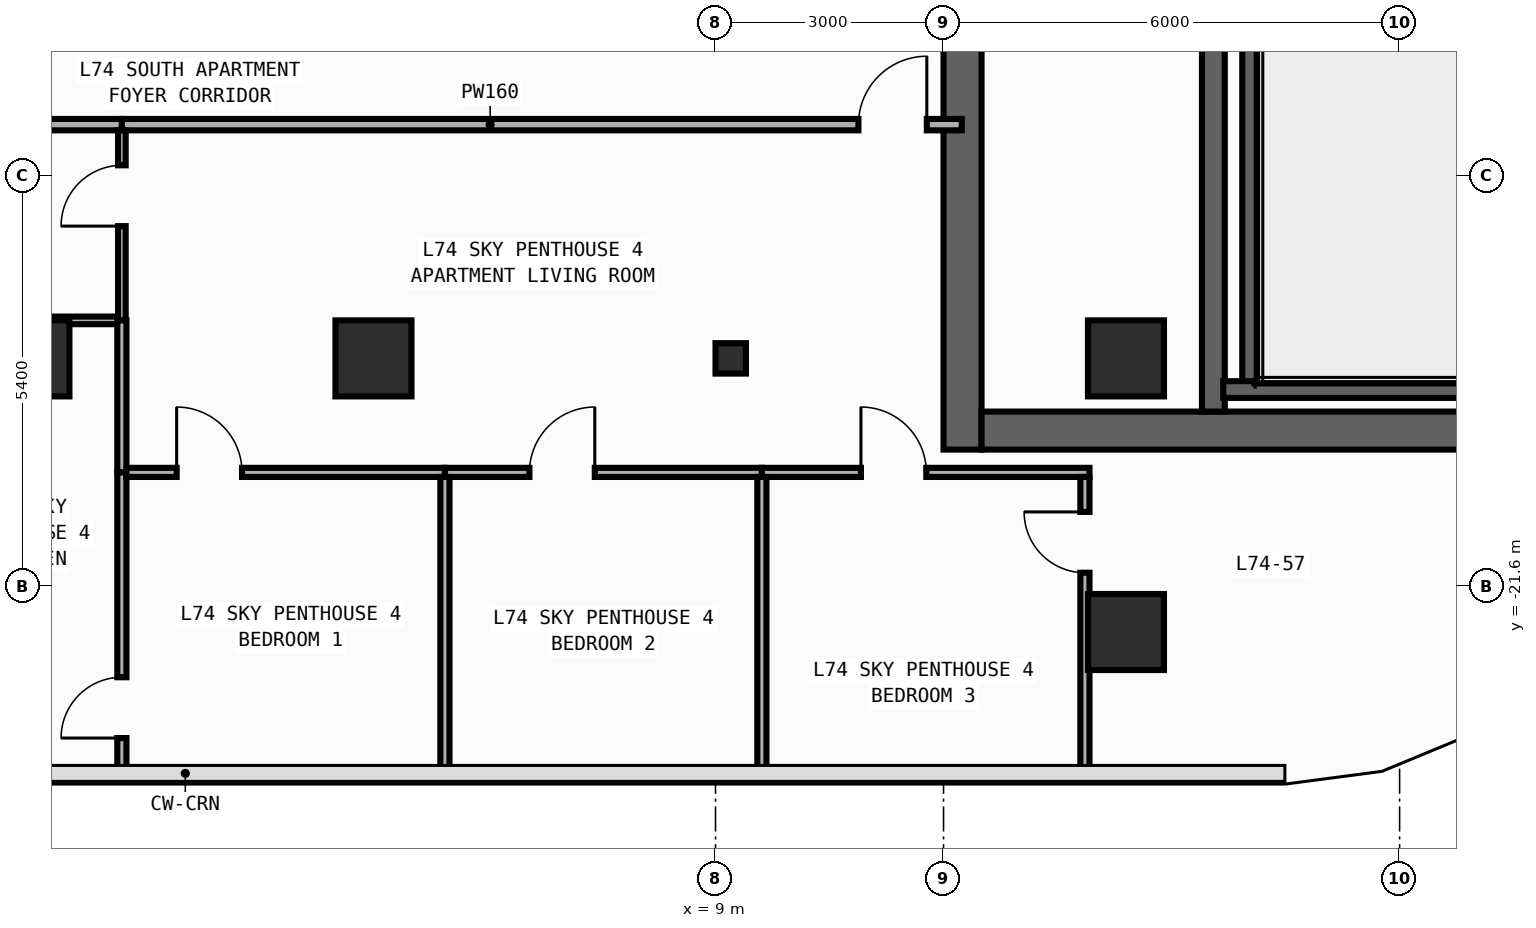
"""IFC4 building model, lengths in metres.
Left out: names, types, materials, properties, quantities, classifications, styles, units other than length and angle.
Written with IfcOpenShell. Run it as: python <this file> out.ifc"""

import sys

from ifc_helpers import new_model, si_unit, direction, frame, frame_2d, origin, origin_2d, place, context, subcontext, project, spatial, rectangle, circle, i_section, extrude, element, fill, save


model = new_model("IFC4")
c1 = context("Model", 3, precision=1e-05, world=origin(), true_north=direction((0.0, 1.0)))
c2 = subcontext(c1, "Body", "Model", "MODEL_VIEW")
j1 = project(units=[si_unit("LENGTHUNIT", "METRE"), si_unit("PLANEANGLEUNIT", "RADIAN")], contexts=[c1])
p1 = place(None, origin())
s1 = spatial("IfcSite", under=j1, at=p1, CompositionType="ELEMENT")
p2 = place(p1, origin())
s2 = spatial("IfcBuilding", under=s1, at=p2, CompositionType="ELEMENT")
p3 = place(p2, frame((0.0, 0.0, 308.0)))
s3 = spatial("IfcBuildingStorey", under=s2, at=p3, CompositionType="ELEMENT", Elevation=308.0)
p4 = place(p3, frame((12.25, -19.8, 0.0), z_axis=(0.0, 0.0, 1.0), x_axis=(0.0, 1.0, 0.0)))
e1 = element("IfcWall", 1, at=p4, inside=s3, PredefinedType="SHEAR", context=c2, shape_type="SweptSolid", body=[
    extrude(rectangle(XDim=27.0, YDim=0.5, at=frame_2d((13.5, 0.0))), origin(), (0.0, 0.0, 1.0), 3.54),
])
p5 = place(p4, frame((23.05, 0.0, 0.0)))
e2 = element("IfcOpeningElement", 2, at=p5, cuts=e1, PredefinedType="OPENING", context=c2, shape_type="SweptSolid", body=[
    extrude(rectangle(XDim=1.1, YDim=2.2, at=frame_2d((0.55, 1.1))), frame((0.0, 0.26, 0.0), z_axis=(0.0, -1.0, 0.0), x_axis=(1.0, 0.0, 0.0)), (0.0, 0.0, 1.0), 0.52),
])
p6 = place(p4, frame((19.85, 0.0, 0.0)))
e3 = element("IfcOpeningElement", 3, at=p6, cuts=e1, PredefinedType="OPENING", context=c2, shape_type="SweptSolid", body=[
    extrude(rectangle(XDim=1.1, YDim=2.2, at=frame_2d((0.55, 1.1))), frame((0.0, 0.26, 0.0), z_axis=(0.0, -1.0, 0.0), x_axis=(1.0, 0.0, 0.0)), (0.0, 0.0, 1.0), 0.52),
])
p7 = place(p4, frame((16.65, 0.0, 0.0)))
e4 = element("IfcOpeningElement", 4, at=p7, cuts=e1, PredefinedType="OPENING", context=c2, shape_type="SweptSolid", body=[
    extrude(rectangle(XDim=1.1, YDim=2.2, at=frame_2d((0.55, 1.1))), frame((0.0, 0.26, 0.0), z_axis=(0.0, -1.0, 0.0), x_axis=(1.0, 0.0, 0.0)), (0.0, 0.0, 1.0), 0.52),
])
p8 = place(p4, frame((6.275, 0.0, 0.0)))
e5 = element("IfcOpeningElement", 5, at=p8, cuts=e1, PredefinedType="OPENING", context=c2, shape_type="SweptSolid", body=[
    extrude(rectangle(XDim=0.85, YDim=2.1, at=frame_2d((0.425, 1.05))), frame((0.0, 0.26, 0.0), z_axis=(0.0, -1.0, 0.0), x_axis=(1.0, 0.0, 0.0)), (0.0, 0.0, 1.0), 0.52),
])
p9 = place(p4, frame((8.575, 0.0, 0.0)))
e6 = element("IfcOpeningElement", 6, at=p9, cuts=e1, PredefinedType="OPENING", context=c2, shape_type="SweptSolid", body=[
    extrude(rectangle(XDim=0.85, YDim=2.1, at=frame_2d((0.425, 1.05))), frame((0.0, 0.26, 0.0), z_axis=(0.0, -1.0, 0.0), x_axis=(1.0, 0.0, 0.0)), (0.0, 0.0, 1.0), 0.52),
])
p10 = place(p4, frame((10.675, 0.0, 0.0)))
e7 = element("IfcOpeningElement", 7, at=p10, cuts=e1, PredefinedType="OPENING", context=c2, shape_type="SweptSolid", body=[
    extrude(rectangle(XDim=0.85, YDim=2.1, at=frame_2d((0.425, 1.05))), frame((0.0, 0.26, 0.0), z_axis=(0.0, -1.0, 0.0), x_axis=(1.0, 0.0, 0.0)), (0.0, 0.0, 1.0), 0.52),
])
p11 = place(p4, frame((12.725, 0.0, 0.0)))
e8 = element("IfcOpeningElement", 8, at=p11, cuts=e1, PredefinedType="OPENING", context=c2, shape_type="SweptSolid", body=[
    extrude(rectangle(XDim=1.15, YDim=2.2, at=frame_2d((0.575, 1.1))), frame((0.0, 0.26, 0.0), z_axis=(0.0, -1.0, 0.0), x_axis=(1.0, 0.0, 0.0)), (0.0, 0.0, 1.0), 0.52),
])
p12 = place(p4, frame((25.125, 0.0, 0.0)))
e9 = element("IfcOpeningElement", 9, at=p12, cuts=e1, PredefinedType="OPENING", context=c2, shape_type="SweptSolid", body=[
    extrude(rectangle(XDim=0.85, YDim=2.1, at=frame_2d((0.425, 1.05))), frame((0.0, 0.26, 0.0), z_axis=(0.0, -1.0, 0.0), x_axis=(1.0, 0.0, 0.0)), (0.0, 0.0, 1.0), 0.52),
])
p13 = place(p3, frame((12.5, -19.55, 0.0), z_axis=(0.0, 0.0, 1.0), x_axis=(1.0, 0.0, 0.0)))
e10 = element("IfcWall", 10, at=p13, inside=s3, PredefinedType="SHEAR", context=c2, shape_type="SweptSolid", body=[
    extrude(rectangle(XDim=7.4, YDim=0.5, at=frame_2d((3.7, 0.0))), origin(), (0.0, 0.0, 1.0), 3.54),
])
p14 = place(p3, frame((15.55, -19.3, 0.0), z_axis=(0.0, 0.0, 1.0), x_axis=(0.0, 1.0, 0.0)))
e11 = element("IfcWall", 11, at=p14, inside=s3, PredefinedType="SHEAR", context=c2, shape_type="SweptSolid", body=[
    extrude(rectangle(XDim=26.0, YDim=0.3, at=frame_2d((13.0, 0.0))), origin(), (0.0, 0.0, 1.0), 3.54),
])
p15 = place(p14, frame((12.225, 0.0, 0.0)))
e12 = element("IfcOpeningElement", 12, at=p15, cuts=e11, PredefinedType="OPENING", context=c2, shape_type="SweptSolid", body=[
    extrude(rectangle(XDim=1.15, YDim=2.2, at=frame_2d((0.575, 1.1))), frame((0.0, 0.16, 0.0), z_axis=(0.0, -1.0, 0.0), x_axis=(1.0, 0.0, 0.0)), (0.0, 0.0, 1.0), 0.32),
])
p16 = place(p14, frame((24.625, 0.0, 0.0)))
e13 = element("IfcOpeningElement", 13, at=p16, cuts=e11, PredefinedType="OPENING", context=c2, shape_type="SweptSolid", body=[
    extrude(rectangle(XDim=0.85, YDim=2.1, at=frame_2d((0.425, 1.05))), frame((0.0, 0.16, 0.0), z_axis=(0.0, -1.0, 0.0), x_axis=(1.0, 0.0, 0.0)), (0.0, 0.0, 1.0), 0.32),
])
p17 = place(p3, frame((16.04, -19.01, 0.0), z_axis=(0.0, 0.0, 1.0), x_axis=(0.0, 1.0, 0.0)))
e14 = element("IfcWall", 14, at=p17, inside=s3, PredefinedType="SHEAR", context=c2, shape_type="SweptSolid", body=[
    extrude(rectangle(XDim=11.42, YDim=0.22, at=frame_2d((5.71, 0.0))), origin(), (0.0, 0.0, 1.0), 3.54),
])
p18 = place(p3, frame((15.68, -19.01, 0.0), z_axis=(0.0, 0.0, 1.0), x_axis=(1.0, 0.0, 0.0)))
e15 = element("IfcWall", 15, at=p18, inside=s3, PredefinedType="SHEAR", context=c2, shape_type="SweptSolid", body=[
    extrude(rectangle(XDim=4.24, YDim=0.22, at=frame_2d((2.12, 0.0))), origin(), (0.0, 0.0, 1.0), 3.54),
])
p19 = place(p3, frame((9.2, -18.6, 0.0), z_axis=(0.0, 0.0, 1.0), x_axis=(1.0, 0.0, 0.0)))
e16 = element("IfcColumn", 16, at=p19, inside=s3, PredefinedType="COLUMN", context=c2, shape_type="SweptSolid", body=[
    extrude(i_section(OverallWidth=0.4, OverallDepth=0.4, WebThickness=0.013, FlangeThickness=0.021, FilletRadius=0.022, at=origin_2d()), origin(), (0.0, 0.0, 1.0), 3.8),
])
for number, where, z_axis, x_axis in (
    (17, (14.4, -18.6, 0.0), (0.0, 0.0, 1.0), (1.0, 0.0, 0.0)),
    (18, (0.0, -18.6, 0.0), (0.0, 0.0, 1.0), (1.0, 0.0, 0.0)),
    (19, (4.5, -18.6, 0.0), (0.0, 0.0, 1.0), (1.0, 0.0, 0.0)),
    (20, (14.4, -22.2, 0.0), (0.0, 0.0, 1.0), (1.0, 0.0, 0.0)),
):
    element("IfcColumn", number, at=place(p3, frame(where, z_axis=z_axis, x_axis=x_axis)), inside=s3, PredefinedType="COLUMN", context=c2, shape_type="SweptSolid", body=[
        extrude(circle(Radius=0.5, at=origin_2d()), origin(), (0.0, 0.0, 1.0), 3.8),
    ])
p20 = place(p3, frame((-1.4, -15.525, 0.0), z_axis=(0.0, 0.0, 1.0), x_axis=(1.0, 0.0, 0.0)))
e21 = element("IfcWall", 21, at=p20, inside=s3, PredefinedType="PARTITIONING", context=c2, shape_type="SweptSolid", body=[
    extrude(rectangle(XDim=2.59, YDim=0.15, at=frame_2d((1.295, 0.0))), origin(), (0.0, 0.0, 1.0), 3.54),
])
p21 = place(p3, frame((1.19, -15.525, 0.0), z_axis=(0.0, 0.0, 1.0), x_axis=(1.0, 0.0, 0.0)))
e22 = element("IfcWall", 22, at=p21, inside=s3, PredefinedType="PARTITIONING", context=c2, shape_type="SweptSolid", body=[
    extrude(rectangle(XDim=11.05, YDim=0.15, at=frame_2d((5.525, 0.0))), origin(), (0.0, 0.0, 1.0), 3.54),
])
p22 = place(p21, frame((9.69, 0.0, 0.0)))
e23 = element("IfcOpeningElement", 23, at=p22, cuts=e22, PredefinedType="OPENING", context=c2, shape_type="SweptSolid", body=[
    extrude(rectangle(XDim=0.9, YDim=2.15, at=frame_2d((0.45, 1.075))), frame((0.0, 0.085, 0.0), z_axis=(0.0, -1.0, 0.0), x_axis=(1.0, 0.0, 0.0)), (0.0, 0.0, 1.0), 0.17),
])
p23 = place(p3, frame((-1.33, -18.1, 0.0), z_axis=(0.0, 0.0, 1.0), x_axis=(1.0, 0.0, 0.0)))
e24 = element("IfcWall", 24, at=p23, inside=s3, PredefinedType="PARTITIONING", context=c2, shape_type="SweptSolid", body=[
    extrude(rectangle(XDim=2.47, YDim=0.1, at=frame_2d((1.235, 0.0))), origin(), (0.0, 0.0, 1.0), 3.54),
])
p24 = place(p3, frame((1.19, -18.1, 0.0), z_axis=(0.0, 0.0, 1.0), x_axis=(0.0, 1.0, 0.0)))
e25 = element("IfcWall", 25, at=p24, inside=s3, PredefinedType="PARTITIONING", context=c2, shape_type="SweptSolid", body=[
    extrude(rectangle(XDim=2.5, YDim=0.1, at=frame_2d((1.25, 0.0))), origin(), (0.0, 0.0, 1.0), 3.54),
])
p25 = place(p24, frame((1.24, 0.0, 0.0)))
e26 = element("IfcOpeningElement", 26, at=p25, cuts=e25, PredefinedType="OPENING", context=c2, shape_type="SweptSolid", body=[
    extrude(rectangle(XDim=0.8, YDim=2.1, at=frame_2d((0.4, 1.05))), frame((0.0, 0.06, 0.0), z_axis=(0.0, -1.0, 0.0), x_axis=(1.0, 0.0, 0.0)), (0.0, 0.0, 1.0), 0.12),
])
p26 = place(p3, frame((1.19, -20.1, 0.0), z_axis=(0.0, 0.0, 1.0), x_axis=(0.0, 1.0, 0.0)))
e27 = element("IfcWall", 27, at=p26, inside=s3, PredefinedType="PARTITIONING", context=c2, shape_type="SweptSolid", body=[
    extrude(rectangle(XDim=2.0, YDim=0.12, at=frame_2d((1.0, 0.0))), origin(), (0.0, 0.0, 1.0), 3.54),
])
p27 = place(p3, frame((1.19, -24.055, 0.0), z_axis=(0.0, 0.0, 1.0), x_axis=(0.0, 1.0, 0.0)))
e28 = element("IfcWall", 28, at=p27, inside=s3, PredefinedType="PARTITIONING", context=c2, shape_type="SweptSolid", body=[
    extrude(rectangle(XDim=3.955, YDim=0.12, at=frame_2d((1.978, 0.0))), origin(), (0.0, 0.0, 1.0), 3.54),
])
p28 = place(p27, frame((0.46, 0.0, 0.0)))
e29 = element("IfcOpeningElement", 29, at=p28, cuts=e28, PredefinedType="OPENING", context=c2, shape_type="SweptSolid", body=[
    extrude(rectangle(XDim=0.8, YDim=2.1, at=frame_2d((0.4, 1.05))), frame((0.0, 0.07, 0.0), z_axis=(0.0, -1.0, 0.0), x_axis=(1.0, 0.0, 0.0)), (0.0, 0.0, 1.0), 0.14),
])
p29 = place(p3, frame((1.25, -20.1, 0.0), z_axis=(0.0, 0.0, 1.0), x_axis=(1.0, 0.0, 0.0)))
e30 = element("IfcWall", 30, at=p29, inside=s3, PredefinedType="PARTITIONING", context=c2, shape_type="SweptSolid", body=[
    extrude(rectangle(XDim=4.19, YDim=0.12, at=frame_2d((2.095, 0.0))), origin(), (0.0, 0.0, 1.0), 3.54),
])
p30 = place(p29, frame((0.661, 0.0, 0.0)))
e31 = element("IfcOpeningElement", 31, at=p30, cuts=e30, PredefinedType="OPENING", context=c2, shape_type="SweptSolid", body=[
    extrude(rectangle(XDim=0.86, YDim=2.15, at=frame_2d((0.43, 1.075))), frame((0.0, 0.07, 0.0), z_axis=(0.0, -1.0, 0.0), x_axis=(1.0, 0.0, 0.0)), (0.0, 0.0, 1.0), 0.14),
])
p31 = place(p3, frame((5.44, -20.1, 0.0), z_axis=(0.0, 0.0, 1.0), x_axis=(1.0, 0.0, 0.0)))
e32 = element("IfcWall", 32, at=p31, inside=s3, PredefinedType="PARTITIONING", context=c2, shape_type="SweptSolid", body=[
    extrude(rectangle(XDim=4.17, YDim=0.12, at=frame_2d((2.085, 0.0))), origin(), (0.0, 0.0, 1.0), 3.54),
])
p32 = place(p31, frame((1.112, 0.0, 0.0)))
e33 = element("IfcOpeningElement", 33, at=p32, cuts=e32, PredefinedType="OPENING", context=c2, shape_type="SweptSolid", body=[
    extrude(rectangle(XDim=0.86, YDim=2.15, at=frame_2d((0.43, 1.075))), frame((0.0, 0.07, 0.0), z_axis=(0.0, -1.0, 0.0), x_axis=(1.0, 0.0, 0.0)), (0.0, 0.0, 1.0), 0.14),
])
p33 = place(p3, frame((9.61, -20.1, 0.0), z_axis=(0.0, 0.0, 1.0), x_axis=(1.0, 0.0, 0.0)))
e34 = element("IfcWall", 34, at=p33, inside=s3, PredefinedType="PARTITIONING", context=c2, shape_type="SweptSolid", body=[
    extrude(rectangle(XDim=4.31, YDim=0.12, at=frame_2d((2.155, 0.0))), origin(), (0.0, 0.0, 1.0), 3.54),
])
p34 = place(p33, frame((1.303, 0.0, 0.0)))
e35 = element("IfcOpeningElement", 35, at=p34, cuts=e34, PredefinedType="OPENING", context=c2, shape_type="SweptSolid", body=[
    extrude(rectangle(XDim=0.86, YDim=2.15, at=frame_2d((0.43, 1.075))), frame((0.0, 0.07, 0.0), z_axis=(0.0, -1.0, 0.0), x_axis=(1.0, 0.0, 0.0)), (0.0, 0.0, 1.0), 0.14),
])
p35 = place(p3, frame((13.86, -24.055, 0.0), z_axis=(0.0, 0.0, 1.0), x_axis=(0.0, 1.0, 0.0)))
e36 = element("IfcWall", 36, at=p35, inside=s3, PredefinedType="PARTITIONING", context=c2, shape_type="SweptSolid", body=[
    extrude(rectangle(XDim=3.895, YDim=0.12, at=frame_2d((1.948, 0.0))), origin(), (0.0, 0.0, 1.0), 3.54),
])
p36 = place(p35, frame((2.635, 0.0, 0.0)))
e37 = element("IfcOpeningElement", 37, at=p36, cuts=e36, PredefinedType="OPENING", context=c2, shape_type="SweptSolid", body=[
    extrude(rectangle(XDim=0.8, YDim=2.1, at=frame_2d((0.4, 1.05))), frame((0.0, 0.07, 0.0), z_axis=(0.0, -1.0, 0.0), x_axis=(1.0, 0.0, 0.0)), (0.0, 0.0, 1.0), 0.14),
])
for number, where, z_axis, x_axis in (
    (38, (5.44, -24.055, 0.0), (0.0, 0.0, 1.0), (0.0, 1.0, 0.0)),
    (39, (9.61, -24.055, 0.0), (0.0, 0.0, 1.0), (0.0, 1.0, 0.0)),
):
    element("IfcWall", number, at=place(p3, frame(where, z_axis=z_axis, x_axis=x_axis)), inside=s3, PredefinedType="PARTITIONING", context=c2, shape_type="SweptSolid", body=[
        extrude(rectangle(XDim=3.895, YDim=0.12, at=frame_2d((1.948, 0.0))), origin(), (0.0, 0.0, 1.0), 3.54),
    ])
p37 = place(p22, origin())
e40 = element("IfcDoor", 40, at=p37, inside=s3, OperationType="SINGLE_SWING_RIGHT", PredefinedType="DOOR", context=c2, shape_type="SweptSolid", body=[
    extrude(rectangle(XDim=0.9, YDim=2.15, at=frame_2d((0.45, 1.075))), frame((0.0, 0.025, 0.0), z_axis=(0.0, -1.0, 0.0), x_axis=(1.0, 0.0, 0.0)), (0.0, 0.0, 1.0), 0.05),
])
fill(e23, e40)
p38 = place(p25, origin())
e41 = element("IfcDoor", 41, at=p38, inside=s3, OperationType="SINGLE_SWING_LEFT", PredefinedType="DOOR", context=c2, shape_type="SweptSolid", body=[
    extrude(rectangle(XDim=0.8, YDim=2.1, at=frame_2d((0.4, 1.05))), frame((0.0, 0.025, 0.0), z_axis=(0.0, -1.0, 0.0), x_axis=(1.0, 0.0, 0.0)), (0.0, 0.0, 1.0), 0.05),
])
fill(e26, e41)
p39 = place(p30, origin())
e42 = element("IfcDoor", 42, at=p39, inside=s3, OperationType="SINGLE_SWING_LEFT", PredefinedType="DOOR", context=c2, shape_type="SweptSolid", body=[
    extrude(rectangle(XDim=0.86, YDim=2.15, at=frame_2d((0.43, 1.075))), frame((0.0, 0.025, 0.0), z_axis=(0.0, -1.0, 0.0), x_axis=(1.0, 0.0, 0.0)), (0.0, 0.0, 1.0), 0.05),
])
fill(e31, e42)
p40 = place(p32, origin())
e43 = element("IfcDoor", 43, at=p40, inside=s3, OperationType="SINGLE_SWING_RIGHT", PredefinedType="DOOR", context=c2, shape_type="SweptSolid", body=[
    extrude(rectangle(XDim=0.86, YDim=2.15, at=frame_2d((0.43, 1.075))), frame((0.0, 0.025, 0.0), z_axis=(0.0, -1.0, 0.0), x_axis=(1.0, 0.0, 0.0)), (0.0, 0.0, 1.0), 0.05),
])
fill(e33, e43)
p41 = place(p34, origin())
e44 = element("IfcDoor", 44, at=p41, inside=s3, OperationType="SINGLE_SWING_LEFT", PredefinedType="DOOR", context=c2, shape_type="SweptSolid", body=[
    extrude(rectangle(XDim=0.86, YDim=2.15, at=frame_2d((0.43, 1.075))), frame((0.0, 0.025, 0.0), z_axis=(0.0, -1.0, 0.0), x_axis=(1.0, 0.0, 0.0)), (0.0, 0.0, 1.0), 0.05),
])
fill(e35, e44)
p42 = place(p28, origin())
e45 = element("IfcDoor", 45, at=p42, inside=s3, OperationType="SINGLE_SWING_LEFT", PredefinedType="DOOR", context=c2, shape_type="SweptSolid", body=[
    extrude(rectangle(XDim=0.8, YDim=2.1, at=frame_2d((0.4, 1.05))), frame((0.0, 0.025, 0.0), z_axis=(0.0, -1.0, 0.0), x_axis=(1.0, 0.0, 0.0)), (0.0, 0.0, 1.0), 0.05),
])
fill(e29, e45)
p43 = place(p36, origin())
e46 = element("IfcDoor", 46, at=p43, inside=s3, OperationType="SINGLE_SWING_RIGHT", PredefinedType="DOOR", context=c2, shape_type="SweptSolid", body=[
    extrude(rectangle(XDim=0.8, YDim=2.1, at=frame_2d((0.4, 1.05))), frame((0.0, 0.025, 0.0), z_axis=(0.0, -1.0, 0.0), x_axis=(1.0, 0.0, 0.0)), (0.0, 0.0, 1.0), 0.05),
])
fill(e37, e46)
save(model, sys.argv[1])
